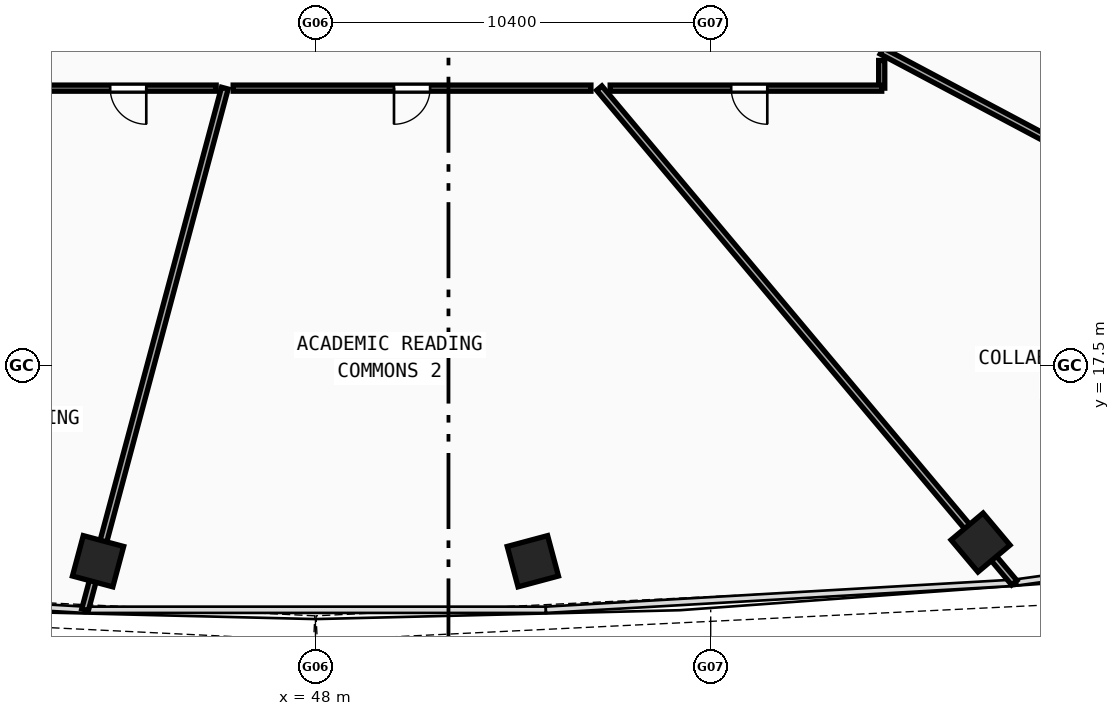
"""IFC4 building model, lengths in metres.
Left out: names, types, materials, properties, quantities, classifications, styles, units other than length and angle.
Written with IfcOpenShell. Run it as: python <this file> out.ifc"""

import sys

from ifc_helpers import new_model, si_unit, direction, frame, frame_2d, origin, origin_with_axes, origin_2d, place, context, subcontext, project, spatial, rectangle, hollow_rectangle, extrude, source, transform, mapped, element, fill, save


model = new_model("IFC4")
c1 = context("Model", 3, precision=1e-05, world=origin(), true_north=direction((0.0, 1.0)))
c2 = subcontext(c1, "Body", "Model", "MODEL_VIEW")
j1 = project(units=[si_unit("LENGTHUNIT", "METRE"), si_unit("PLANEANGLEUNIT", "RADIAN")], contexts=[c1])
p1 = place(None, origin())
s1 = spatial("IfcSite", under=j1, at=p1, CompositionType="ELEMENT")
p2 = place(p1, origin())
s2 = spatial("IfcBuilding", under=s1, at=p2, CompositionType="ELEMENT")
p3 = place(p2, frame((0.0, 0.0, 59.44)))
s3 = spatial("IfcBuildingStorey", under=s2, at=p3, CompositionType="ELEMENT", Elevation=59.44)
m1 = source(origin(), c2, "Body", "SweptSolid", [
    extrude(hollow_rectangle(XDim=1.1, YDim=1.1, WallThickness=0.045, at=origin_2d()), origin(), (0.0, 0.0, 1.0), 3.63),
])
for number, where, z_axis, x_axis in (
    (1, (42.28, 12.352, -0.26), (0.0, 0.0, 1.0), (0.966, -0.259, 0.0)),
    (2, (53.72, 12.352, -0.26), (0.0, 0.0, 1.0), (0.966, 0.259, 0.0)),
    (3, (65.5, 12.844, -0.26), (0.0, 0.0, 1.0), (0.766, 0.643, 0.0)),
):
    element("IfcColumn", number, at=place(p3, frame(where, z_axis=z_axis, x_axis=x_axis)), inside=s3, PredefinedType="COLUMN", context=c2, shape_type="MappedRepresentation", body=[
        mapped(m1, transform((0.0, 0.0, 0.0), scale=1.0)),
    ])
p4 = place(p3, frame((45.615, 24.8, 0.0), z_axis=(0.0, 0.0, 1.0), x_axis=(-0.258821679731, -0.965925120339, 0.0)))
e4 = element("IfcWall", 4, at=p4, inside=s3, PredefinedType="PARTITIONING", context=c2, shape_type="SweptSolid", body=[
    extrude(rectangle(XDim=14.209, YDim=0.18, at=frame_2d((7.105, 0.0))), origin(), (0.0, 0.0, 1.0), 2.67),
])
p5 = place(p3, frame((55.468, 24.8, 0.0), z_axis=(0.0, 0.0, 1.0), x_axis=(0.642791593325, -0.766041100432, 0.0)))
e5 = element("IfcWall", 5, at=p5, inside=s3, PredefinedType="PARTITIONING", context=c2, shape_type="SweptSolid", body=[
    extrude(rectangle(XDim=16.988, YDim=0.18, at=frame_2d((8.494, 0.0))), origin(), (0.0, 0.0, 1.0), 2.67),
])
p6 = place(p3, frame((62.9, 25.778, 0.0), z_axis=(0.0, 0.0, 1.0), x_axis=(0.882949316257, -0.469468321531, 0.0)))
e6 = element("IfcWall", 6, at=p6, inside=s3, PredefinedType="PARTITIONING", context=c2, shape_type="SweptSolid", body=[
    extrude(rectangle(XDim=24.437, YDim=0.18, at=frame_2d((12.219, 0.0))), origin(), (0.0, 0.0, 1.0), 2.67),
])
p7 = place(p3, frame((62.9, 25.528, 0.0), z_axis=(0.0, 0.0, 1.0), x_axis=(0.0, -1.0, 0.0)))
e7 = element("IfcWall", 7, at=p7, inside=s3, PredefinedType="PARTITIONING", context=c2, shape_type="SweptSolid", body=[
    extrude(rectangle(XDim=0.728, YDim=0.16, at=frame_2d((0.364, 0.0))), origin(), (0.0, 0.0, 1.0), 2.97),
])
p8 = place(p3, frame((62.9, 24.8, 0.0), z_axis=(0.0, 0.0, 1.0), x_axis=(-1.0, 0.0, 0.0)))
e8 = element("IfcWall", 8, at=p8, inside=s3, PredefinedType="PARTITIONING", context=c2, shape_type="SweptSolid", body=[
    extrude(rectangle(XDim=7.145, YDim=0.16, at=frame_2d((3.572, 0.0))), origin(), (0.0, 0.0, 1.0), 2.97),
])
p9 = place(p8, frame((3.011, 0.0, 0.0)))
e9 = element("IfcOpeningElement", 9, at=p9, cuts=e8, PredefinedType="OPENING", context=c2, shape_type="SweptSolid", body=[
    extrude(rectangle(XDim=0.95, YDim=2.1, at=frame_2d((0.475, 1.05))), frame((0.0, 0.09, 0.0), z_axis=(0.0, -1.0, 0.0), x_axis=(1.0, 0.0, 0.0)), (0.0, 0.0, 1.0), 0.18),
])
p10 = place(p3, frame((55.248, 24.8, 0.0), z_axis=(0.0, 0.0, 1.0), x_axis=(-1.0, 0.0, 0.0)))
e10 = element("IfcWall", 10, at=p10, inside=s3, PredefinedType="PARTITIONING", context=c2, shape_type="SweptSolid", body=[
    extrude(rectangle(XDim=9.413, YDim=0.16, at=frame_2d((4.707, 0.0))), origin(), (0.0, 0.0, 1.0), 2.67),
])
p11 = place(p10, frame((4.231, 0.0, 0.0)))
e11 = element("IfcOpeningElement", 11, at=p11, cuts=e10, PredefinedType="OPENING", context=c2, shape_type="SweptSolid", body=[
    extrude(rectangle(XDim=0.95, YDim=2.1, at=frame_2d((0.475, 1.05))), frame((0.0, 0.09, 0.0), z_axis=(0.0, -1.0, 0.0), x_axis=(1.0, 0.0, 0.0)), (0.0, 0.0, 1.0), 0.18),
])
p12 = place(p3, frame((45.387, 24.8, 0.0), z_axis=(0.0, 0.0, 1.0), x_axis=(-1.0, 0.0, 0.0)))
e12 = element("IfcWall", 12, at=p12, inside=s3, PredefinedType="PARTITIONING", context=c2, shape_type="SweptSolid", body=[
    extrude(rectangle(XDim=4.635, YDim=0.16, at=frame_2d((2.318, 0.0))), origin(), (0.0, 0.0, 1.0), 2.67),
])
p13 = place(p12, frame((1.839, 0.0, 0.0)))
e13 = element("IfcOpeningElement", 13, at=p13, cuts=e12, PredefinedType="OPENING", context=c2, shape_type="SweptSolid", body=[
    extrude(rectangle(XDim=0.95, YDim=2.1, at=frame_2d((0.475, 1.05))), frame((0.0, 0.09, 0.0), z_axis=(0.0, -1.0, 0.0), x_axis=(1.0, 0.0, 0.0)), (0.0, 0.0, 1.0), 0.18),
])
m2 = source(origin(), c2, "Body", "SweptSolid", [
    extrude(rectangle(XDim=0.95, YDim=2.1, at=frame_2d((0.475, 1.05))), frame((0.0, 0.025, 0.0), z_axis=(0.0, -1.0, 0.0), x_axis=(1.0, 0.0, 0.0)), (0.0, 0.0, 1.0), 0.05),
])
p14 = place(p13, origin_with_axes())
e14 = element("IfcDoor", 14, at=p14, inside=s3, OperationType="SINGLE_SWING_LEFT", PredefinedType="DOOR", context=c2, shape_type="MappedRepresentation", body=[
    mapped(m2, transform((0.0, 0.0, 0.0), scale=1.0)),
])
fill(e13, e14)
p15 = place(p11, origin_with_axes())
e15 = element("IfcDoor", 15, at=p15, inside=s3, OperationType="SINGLE_SWING_RIGHT", PredefinedType="DOOR", context=c2, shape_type="MappedRepresentation", body=[
    mapped(m2, transform((0.0, 0.0, 0.0), scale=1.0)),
])
fill(e11, e15)
p16 = place(p9, origin_with_axes())
e16 = element("IfcDoor", 16, at=p16, inside=s3, OperationType="SINGLE_SWING_LEFT", PredefinedType="DOOR", context=c2, shape_type="MappedRepresentation", body=[
    mapped(m2, transform((0.0, 0.0, 0.0), scale=1.0)),
])
fill(e9, e16)
save(model, sys.argv[1])
